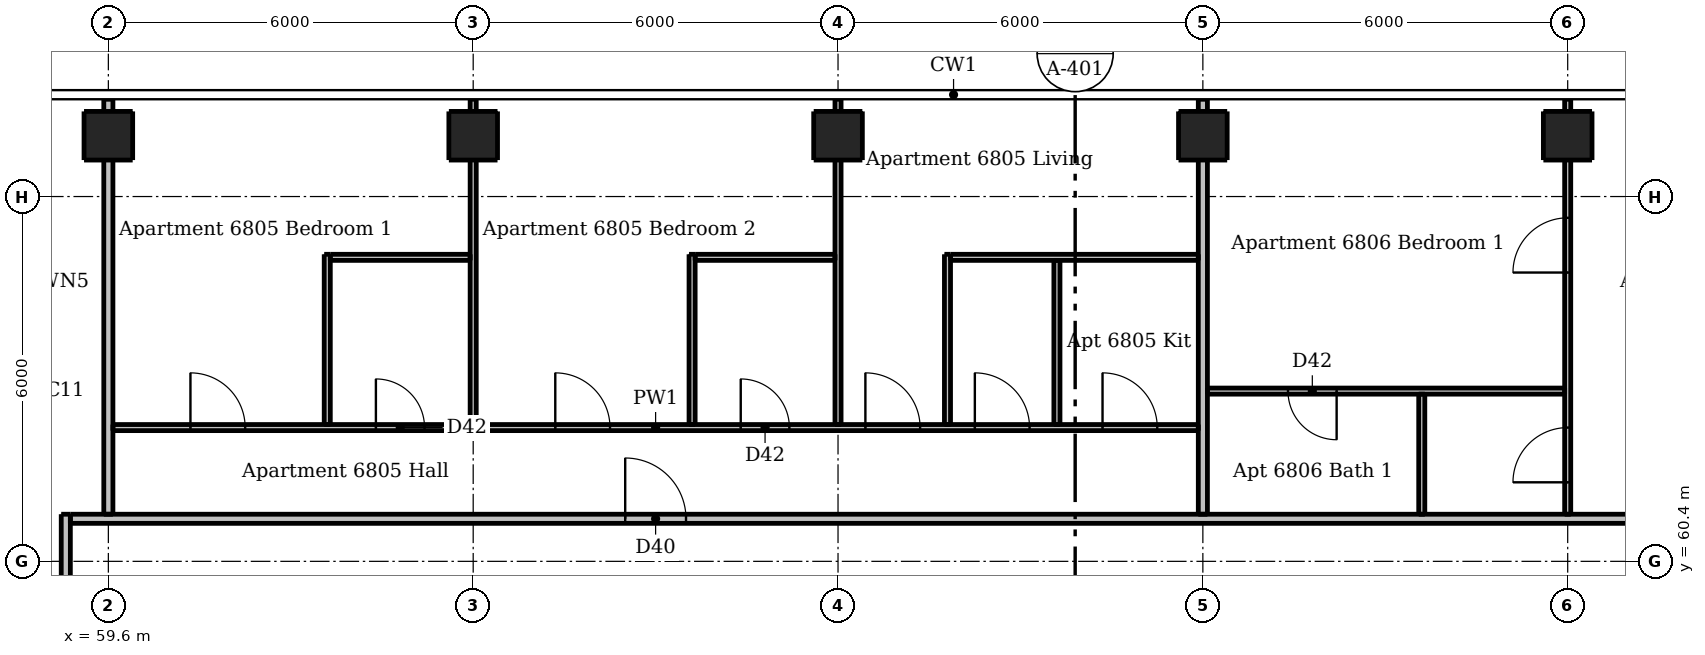
"""IFC4 building model, lengths in metres.
Left out: names, types, materials, properties, quantities, classifications, styles, units other than length and angle.
Written with IfcOpenShell. Run it as: python <this file> out.ifc"""

import sys

from ifc_helpers import new_model, si_unit, direction, frame, frame_2d, origin, origin_2d, place, context, subcontext, project, spatial, rectangle, extrude, element, fill, save


model = new_model("IFC4")
c1 = context("Model", 3, precision=1e-05, world=origin(), true_north=direction((0.0, 1.0)))
c2 = subcontext(c1, "Body", "Model", "MODEL_VIEW")
j1 = project(units=[si_unit("LENGTHUNIT", "METRE"), si_unit("PLANEANGLEUNIT", "RADIAN")], contexts=[c1])
p1 = place(None, origin())
s1 = spatial("IfcSite", under=j1, at=p1, CompositionType="ELEMENT")
p2 = place(p1, origin())
s2 = spatial("IfcBuilding", under=s1, at=p2, CompositionType="ELEMENT")
p3 = place(p2, frame((0.0, 0.0, 255.4)))
s3 = spatial("IfcBuildingStorey", under=s2, at=p3, CompositionType="ELEMENT", Elevation=255.4)
for number, where, z_axis, x_axis in (
    (1, (59.6, 67.4, 0.0), (0.0, 0.0, 1.0), (1.0, 0.0, 0.0)),
    (2, (65.6, 67.4, 0.0), (0.0, 0.0, 1.0), (1.0, 0.0, 0.0)),
    (3, (71.6, 67.4, 0.0), (0.0, 0.0, 1.0), (1.0, 0.0, 0.0)),
    (4, (77.6, 67.4, 0.0), (0.0, 0.0, 1.0), (1.0, 0.0, 0.0)),
    (5, (83.6, 67.4, 0.0), (0.0, 0.0, 1.0), (1.0, 0.0, 0.0)),
):
    element("IfcColumn", number, at=place(p3, frame(where, z_axis=z_axis, x_axis=x_axis)), inside=s3, PredefinedType="COLUMN", context=c2, shape_type="SweptSolid", body=[
        extrude(rectangle(XDim=0.8, YDim=0.8, at=origin_2d()), origin(), (0.0, 0.0, 1.0), 3.05),
    ])
p4 = place(p3, frame((63.2, 62.65, 0.0), z_axis=(0.0, 0.0, 1.0), x_axis=(0.0, 1.0, 0.0)))
e6 = element("IfcWall", 6, at=p4, inside=s3, PredefinedType="PARTITIONING", context=c2, shape_type="SweptSolid", body=[
    extrude(rectangle(XDim=2.8, YDim=0.1, at=frame_2d((1.4, 0.0))), origin(), (0.0, 0.0, 1.0), 3.05),
])
p5 = place(p3, frame((65.6, 62.65, 0.0), z_axis=(0.0, 0.0, 1.0), x_axis=(0.0, 1.0, 0.0)))
e7 = element("IfcWall", 7, at=p5, inside=s3, PredefinedType="PARTITIONING", context=c2, shape_type="SweptSolid", body=[
    extrude(rectangle(XDim=5.35, YDim=0.1, at=frame_2d((2.675, 0.0))), origin(), (0.0, 0.0, 1.0), 2.516),
])
p6 = place(p3, frame((69.2, 62.65, 0.0), z_axis=(0.0, 0.0, 1.0), x_axis=(0.0, 1.0, 0.0)))
e8 = element("IfcWall", 8, at=p6, inside=s3, PredefinedType="PARTITIONING", context=c2, shape_type="SweptSolid", body=[
    extrude(rectangle(XDim=2.8, YDim=0.1, at=frame_2d((1.4, 0.0))), origin(), (0.0, 0.0, 1.0), 3.05),
])
p7 = place(p3, frame((71.6, 62.65, 0.0), z_axis=(0.0, 0.0, 1.0), x_axis=(0.0, 1.0, 0.0)))
e9 = element("IfcWall", 9, at=p7, inside=s3, PredefinedType="PARTITIONING", context=c2, shape_type="SweptSolid", body=[
    extrude(rectangle(XDim=5.35, YDim=0.1, at=frame_2d((2.675, 0.0))), origin(), (0.0, 0.0, 1.0), 2.516),
])
p8 = place(p3, frame((73.4, 62.65, 0.0), z_axis=(0.0, 0.0, 1.0), x_axis=(0.0, 1.0, 0.0)))
e10 = element("IfcWall", 10, at=p8, inside=s3, PredefinedType="PARTITIONING", context=c2, shape_type="SweptSolid", body=[
    extrude(rectangle(XDim=2.8, YDim=0.1, at=frame_2d((1.4, 0.0))), origin(), (0.0, 0.0, 1.0), 3.05),
])
p9 = place(p3, frame((75.2, 62.65, 0.0), z_axis=(0.0, 0.0, 1.0), x_axis=(0.0, 1.0, 0.0)))
e11 = element("IfcWall", 11, at=p9, inside=s3, PredefinedType="PARTITIONING", context=c2, shape_type="SweptSolid", body=[
    extrude(rectangle(XDim=2.7, YDim=0.1, at=frame_2d((1.35, 0.0))), origin(), (0.0, 0.0, 1.0), 3.05),
])
p10 = place(p3, frame((81.2, 61.175, 0.0), z_axis=(0.0, 0.0, 1.0), x_axis=(0.0, 1.0, 0.0)))
e12 = element("IfcWall", 12, at=p10, inside=s3, PredefinedType="PARTITIONING", context=c2, shape_type="SweptSolid", body=[
    extrude(rectangle(XDim=1.975, YDim=0.1, at=frame_2d((0.987, 0.0))), origin(), (0.0, 0.0, 1.0), 3.05),
])
p11 = place(p3, frame((83.6, 61.175, 0.0), z_axis=(0.0, 0.0, 1.0), x_axis=(0.0, 1.0, 0.0)))
e13 = element("IfcWall", 13, at=p11, inside=s3, PredefinedType="PARTITIONING", context=c2, shape_type="SweptSolid", body=[
    extrude(rectangle(XDim=6.825, YDim=0.1, at=frame_2d((3.413, 0.0))), origin(), (0.0, 0.0, 1.0), 2.516),
])
p12 = place(p11, frame((0.525, 0.0, 0.0)))
e14 = element("IfcOpeningElement", 14, at=p12, cuts=e13, PredefinedType="OPENING", context=c2, shape_type="SweptSolid", body=[
    extrude(rectangle(XDim=0.9, YDim=2.1, at=frame_2d((0.45, 1.05))), frame((0.0, 0.06, 0.0), z_axis=(0.0, -1.0, 0.0), x_axis=(1.0, 0.0, 0.0)), (0.0, 0.0, 1.0), 0.12),
])
p13 = place(p11, frame((3.975, 0.0, 0.0)))
e15 = element("IfcOpeningElement", 15, at=p13, cuts=e13, PredefinedType="OPENING", context=c2, shape_type="SweptSolid", body=[
    extrude(rectangle(XDim=0.9, YDim=2.1, at=frame_2d((0.45, 1.05))), frame((0.0, 0.06, 0.0), z_axis=(0.0, -1.0, 0.0), x_axis=(1.0, 0.0, 0.0)), (0.0, 0.0, 1.0), 0.12),
])
for number, where, z_axis, x_axis in (
    (16, (63.25, 65.4, 0.0), (0.0, 0.0, 1.0), (1.0, 0.0, 0.0)),
    (17, (69.25, 65.4, 0.0), (0.0, 0.0, 1.0), (1.0, 0.0, 0.0)),
):
    element("IfcWall", number, at=place(p3, frame(where, z_axis=z_axis, x_axis=x_axis)), inside=s3, PredefinedType="PARTITIONING", context=c2, shape_type="SweptSolid", body=[
        extrude(rectangle(XDim=2.3, YDim=0.1, at=frame_2d((1.15, 0.0))), origin(), (0.0, 0.0, 1.0), 3.05),
    ])
p14 = place(p3, frame((73.45, 65.4, 0.0), z_axis=(0.0, 0.0, 1.0), x_axis=(1.0, 0.0, 0.0)))
e18 = element("IfcWall", 18, at=p14, inside=s3, PredefinedType="PARTITIONING", context=c2, shape_type="SweptSolid", body=[
    extrude(rectangle(XDim=4.075, YDim=0.1, at=frame_2d((2.038, 0.0))), origin(), (0.0, 0.0, 1.0), 3.05),
])
p15 = place(p3, frame((83.55, 63.2, 0.0), z_axis=(0.0, 0.0, 1.0), x_axis=(-1.0, 0.0, 0.0)))
e19 = element("IfcWall", 19, at=p15, inside=s3, PredefinedType="PARTITIONING", context=c2, shape_type="SweptSolid", body=[
    extrude(rectangle(XDim=5.875, YDim=0.1, at=frame_2d((2.938, 0.0))), origin(), (0.0, 0.0, 1.0), 3.05),
])
p16 = place(p15, frame((3.75, 0.0, 0.0)))
e20 = element("IfcOpeningElement", 20, at=p16, cuts=e19, PredefinedType="OPENING", context=c2, shape_type="SweptSolid", body=[
    extrude(rectangle(XDim=0.8, YDim=2.1, at=frame_2d((0.4, 1.05))), frame((0.0, 0.06, 0.0), z_axis=(0.0, -1.0, 0.0), x_axis=(1.0, 0.0, 0.0)), (0.0, 0.0, 1.0), 0.12),
])
p17 = place(p3, frame((59.675, 62.6, 0.0), z_axis=(0.0, 0.0, 1.0), x_axis=(1.0, 0.0, 0.0)))
e21 = element("IfcWall", 21, at=p17, inside=s3, PredefinedType="PARTITIONING", context=c2, shape_type="SweptSolid", body=[
    extrude(rectangle(XDim=17.85, YDim=0.1, at=frame_2d((8.925, 0.0))), origin(), (0.0, 0.0, 1.0), 3.05),
])
p18 = place(p17, frame((12.375, 0.0, 0.0)))
e22 = element("IfcOpeningElement", 22, at=p18, cuts=e21, PredefinedType="OPENING", context=c2, shape_type="SweptSolid", body=[
    extrude(rectangle(XDim=0.9, YDim=2.1, at=frame_2d((0.45, 1.05))), frame((0.0, 0.06, 0.0), z_axis=(0.0, -1.0, 0.0), x_axis=(1.0, 0.0, 0.0)), (0.0, 0.0, 1.0), 0.12),
])
p19 = place(p17, frame((16.275, 0.0, 0.0)))
e23 = element("IfcOpeningElement", 23, at=p19, cuts=e21, PredefinedType="OPENING", context=c2, shape_type="SweptSolid", body=[
    extrude(rectangle(XDim=0.9, YDim=2.1, at=frame_2d((0.45, 1.05))), frame((0.0, 0.06, 0.0), z_axis=(0.0, -1.0, 0.0), x_axis=(1.0, 0.0, 0.0)), (0.0, 0.0, 1.0), 0.12),
])
p20 = place(p17, frame((14.175, 0.0, 0.0)))
e24 = element("IfcOpeningElement", 24, at=p20, cuts=e21, PredefinedType="OPENING", context=c2, shape_type="SweptSolid", body=[
    extrude(rectangle(XDim=0.9, YDim=2.1, at=frame_2d((0.45, 1.05))), frame((0.0, 0.06, 0.0), z_axis=(0.0, -1.0, 0.0), x_axis=(1.0, 0.0, 0.0)), (0.0, 0.0, 1.0), 0.12),
])
p21 = place(p17, frame((1.275, 0.0, 0.0)))
e25 = element("IfcOpeningElement", 25, at=p21, cuts=e21, PredefinedType="OPENING", context=c2, shape_type="SweptSolid", body=[
    extrude(rectangle(XDim=0.9, YDim=2.1, at=frame_2d((0.45, 1.05))), frame((0.0, 0.06, 0.0), z_axis=(0.0, -1.0, 0.0), x_axis=(1.0, 0.0, 0.0)), (0.0, 0.0, 1.0), 0.12),
])
p22 = place(p17, frame((7.275, 0.0, 0.0)))
e26 = element("IfcOpeningElement", 26, at=p22, cuts=e21, PredefinedType="OPENING", context=c2, shape_type="SweptSolid", body=[
    extrude(rectangle(XDim=0.9, YDim=2.1, at=frame_2d((0.45, 1.05))), frame((0.0, 0.06, 0.0), z_axis=(0.0, -1.0, 0.0), x_axis=(1.0, 0.0, 0.0)), (0.0, 0.0, 1.0), 0.12),
])
p23 = place(p17, frame((4.325, 0.0, 0.0)))
e27 = element("IfcOpeningElement", 27, at=p23, cuts=e21, PredefinedType="OPENING", context=c2, shape_type="SweptSolid", body=[
    extrude(rectangle(XDim=0.8, YDim=2.1, at=frame_2d((0.4, 1.05))), frame((0.0, 0.06, 0.0), z_axis=(0.0, -1.0, 0.0), x_axis=(1.0, 0.0, 0.0)), (0.0, 0.0, 1.0), 0.12),
])
p24 = place(p17, frame((10.325, 0.0, 0.0)))
e28 = element("IfcOpeningElement", 28, at=p24, cuts=e21, PredefinedType="OPENING", context=c2, shape_type="SweptSolid", body=[
    extrude(rectangle(XDim=0.8, YDim=2.1, at=frame_2d((0.4, 1.05))), frame((0.0, 0.06, 0.0), z_axis=(0.0, -1.0, 0.0), x_axis=(1.0, 0.0, 0.0)), (0.0, 0.0, 1.0), 0.12),
])
p25 = place(p3, frame((58.9, 30.325, 0.0), z_axis=(0.0, 0.0, 1.0), x_axis=(0.0, 1.0, 0.0)))
e29 = element("IfcWall", 29, at=p25, inside=s3, PredefinedType="PARTITIONING", context=c2, shape_type="SweptSolid", body=[
    extrude(rectangle(XDim=30.85, YDim=0.15, at=frame_2d((15.425, 0.0))), origin(), (0.0, 0.0, 1.0), 3.05),
])
p26 = place(p25, frame((7.375, 0.0, 0.0)))
e30 = element("IfcOpeningElement", 30, at=p26, cuts=e29, PredefinedType="OPENING", context=c2, shape_type="SweptSolid", body=[
    extrude(rectangle(XDim=1.0, YDim=2.1, at=frame_2d((0.5, 1.05))), frame((0.0, 0.085, 0.0), z_axis=(0.0, -1.0, 0.0), x_axis=(1.0, 0.0, 0.0)), (0.0, 0.0, 1.0), 0.17),
])
p27 = place(p25, frame((26.925, 0.0, 0.0)))
e31 = element("IfcOpeningElement", 31, at=p27, cuts=e29, PredefinedType="OPENING", context=c2, shape_type="SweptSolid", body=[
    extrude(rectangle(XDim=1.0, YDim=2.1, at=frame_2d((0.5, 1.05))), frame((0.0, 0.085, 0.0), z_axis=(0.0, -1.0, 0.0), x_axis=(1.0, 0.0, 0.0)), (0.0, 0.0, 1.0), 0.17),
])
p28 = place(p3, frame((59.6, 61.175, 0.0), z_axis=(0.0, 0.0, 1.0), x_axis=(0.0, 1.0, 0.0)))
e32 = element("IfcWall", 32, at=p28, inside=s3, PredefinedType="PARTITIONING", context=c2, shape_type="SweptSolid", body=[
    extrude(rectangle(XDim=6.825, YDim=0.15, at=frame_2d((3.413, 0.0))), origin(), (0.0, 0.0, 1.0), 2.51),
])
p29 = place(p3, frame((77.6, 61.175, 0.0), z_axis=(0.0, 0.0, 1.0), x_axis=(0.0, 1.0, 0.0)))
e33 = element("IfcWall", 33, at=p29, inside=s3, PredefinedType="PARTITIONING", context=c2, shape_type="SweptSolid", body=[
    extrude(rectangle(XDim=6.825, YDim=0.15, at=frame_2d((3.413, 0.0))), origin(), (0.0, 0.0, 1.0), 2.516),
])
p30 = place(p3, frame((58.975, 61.1, 0.0), z_axis=(0.0, 0.0, 1.0), x_axis=(1.0, 0.0, 0.0)))
e34 = element("IfcWall", 34, at=p30, inside=s3, PredefinedType="PARTITIONING", context=c2, shape_type="SweptSolid", body=[
    extrude(rectangle(XDim=29.25, YDim=0.15, at=frame_2d((14.625, 0.0))), origin(), (0.0, 0.0, 1.0), 3.05),
])
p31 = place(p30, frame((9.125, 0.0, 0.0)))
e35 = element("IfcOpeningElement", 35, at=p31, cuts=e34, PredefinedType="OPENING", context=c2, shape_type="SweptSolid", body=[
    extrude(rectangle(XDim=1.0, YDim=2.1, at=frame_2d((0.5, 1.05))), frame((0.0, 0.085, 0.0), z_axis=(0.0, -1.0, 0.0), x_axis=(1.0, 0.0, 0.0)), (0.0, 0.0, 1.0), 0.17),
])
p32 = place(p30, frame((26.475, 0.0, 0.0)))
e36 = element("IfcOpeningElement", 36, at=p32, cuts=e34, PredefinedType="OPENING", context=c2, shape_type="SweptSolid", body=[
    extrude(rectangle(XDim=1.0, YDim=2.1, at=frame_2d((0.5, 1.05))), frame((0.0, 0.085, 0.0), z_axis=(0.0, -1.0, 0.0), x_axis=(1.0, 0.0, 0.0)), (0.0, 0.0, 1.0), 0.17),
])
p33 = place(p31, origin())
e37 = element("IfcDoor", 37, at=p33, inside=s3, OperationType="SINGLE_SWING_LEFT", PredefinedType="DOOR", context=c2, shape_type="SweptSolid", body=[
    extrude(rectangle(XDim=1.0, YDim=2.1, at=frame_2d((0.5, 1.05))), frame((0.0, 0.025, 0.0), z_axis=(0.0, -1.0, 0.0), x_axis=(1.0, 0.0, 0.0)), (0.0, 0.0, 1.0), 0.05),
])
fill(e35, e37)
p34 = place(p18, origin())
e38 = element("IfcDoor", 38, at=p34, inside=s3, OperationType="SINGLE_SWING_LEFT", PredefinedType="DOOR", context=c2, shape_type="SweptSolid", body=[
    extrude(rectangle(XDim=0.9, YDim=2.1, at=frame_2d((0.45, 1.05))), frame((0.0, 0.025, 0.0), z_axis=(0.0, -1.0, 0.0), x_axis=(1.0, 0.0, 0.0)), (0.0, 0.0, 1.0), 0.05),
])
fill(e22, e38)
p35 = place(p19, origin())
e39 = element("IfcDoor", 39, at=p35, inside=s3, OperationType="SINGLE_SWING_LEFT", PredefinedType="DOOR", context=c2, shape_type="SweptSolid", body=[
    extrude(rectangle(XDim=0.9, YDim=2.1, at=frame_2d((0.45, 1.05))), frame((0.0, 0.025, 0.0), z_axis=(0.0, -1.0, 0.0), x_axis=(1.0, 0.0, 0.0)), (0.0, 0.0, 1.0), 0.05),
])
fill(e23, e39)
p36 = place(p20, origin())
e40 = element("IfcDoor", 40, at=p36, inside=s3, OperationType="SINGLE_SWING_LEFT", PredefinedType="DOOR", context=c2, shape_type="SweptSolid", body=[
    extrude(rectangle(XDim=0.9, YDim=2.1, at=frame_2d((0.45, 1.05))), frame((0.0, 0.025, 0.0), z_axis=(0.0, -1.0, 0.0), x_axis=(1.0, 0.0, 0.0)), (0.0, 0.0, 1.0), 0.05),
])
fill(e24, e40)
p37 = place(p21, origin())
e41 = element("IfcDoor", 41, at=p37, inside=s3, OperationType="SINGLE_SWING_LEFT", PredefinedType="DOOR", context=c2, shape_type="SweptSolid", body=[
    extrude(rectangle(XDim=0.9, YDim=2.1, at=frame_2d((0.45, 1.05))), frame((0.0, 0.025, 0.0), z_axis=(0.0, -1.0, 0.0), x_axis=(1.0, 0.0, 0.0)), (0.0, 0.0, 1.0), 0.05),
])
fill(e25, e41)
p38 = place(p22, origin())
e42 = element("IfcDoor", 42, at=p38, inside=s3, OperationType="SINGLE_SWING_LEFT", PredefinedType="DOOR", context=c2, shape_type="SweptSolid", body=[
    extrude(rectangle(XDim=0.9, YDim=2.1, at=frame_2d((0.45, 1.05))), frame((0.0, 0.025, 0.0), z_axis=(0.0, -1.0, 0.0), x_axis=(1.0, 0.0, 0.0)), (0.0, 0.0, 1.0), 0.05),
])
fill(e26, e42)
p39 = place(p23, origin())
e43 = element("IfcDoor", 43, at=p39, inside=s3, OperationType="SINGLE_SWING_LEFT", PredefinedType="DOOR", context=c2, shape_type="SweptSolid", body=[
    extrude(rectangle(XDim=0.8, YDim=2.1, at=frame_2d((0.4, 1.05))), frame((0.0, 0.025, 0.0), z_axis=(0.0, -1.0, 0.0), x_axis=(1.0, 0.0, 0.0)), (0.0, 0.0, 1.0), 0.05),
])
fill(e27, e43)
p40 = place(p24, origin())
e44 = element("IfcDoor", 44, at=p40, inside=s3, OperationType="SINGLE_SWING_LEFT", PredefinedType="DOOR", context=c2, shape_type="SweptSolid", body=[
    extrude(rectangle(XDim=0.8, YDim=2.1, at=frame_2d((0.4, 1.05))), frame((0.0, 0.025, 0.0), z_axis=(0.0, -1.0, 0.0), x_axis=(1.0, 0.0, 0.0)), (0.0, 0.0, 1.0), 0.05),
])
fill(e28, e44)
p41 = place(p12, origin())
e45 = element("IfcDoor", 45, at=p41, inside=s3, OperationType="SINGLE_SWING_LEFT", PredefinedType="DOOR", context=c2, shape_type="SweptSolid", body=[
    extrude(rectangle(XDim=0.9, YDim=2.1, at=frame_2d((0.45, 1.05))), frame((0.0, 0.025, 0.0), z_axis=(0.0, -1.0, 0.0), x_axis=(1.0, 0.0, 0.0)), (0.0, 0.0, 1.0), 0.05),
])
fill(e14, e45)
p42 = place(p13, origin())
e46 = element("IfcDoor", 46, at=p42, inside=s3, OperationType="SINGLE_SWING_LEFT", PredefinedType="DOOR", context=c2, shape_type="SweptSolid", body=[
    extrude(rectangle(XDim=0.9, YDim=2.1, at=frame_2d((0.45, 1.05))), frame((0.0, 0.025, 0.0), z_axis=(0.0, -1.0, 0.0), x_axis=(1.0, 0.0, 0.0)), (0.0, 0.0, 1.0), 0.05),
])
fill(e15, e46)
p43 = place(p16, origin())
e47 = element("IfcDoor", 47, at=p43, inside=s3, OperationType="SINGLE_SWING_LEFT", PredefinedType="DOOR", context=c2, shape_type="SweptSolid", body=[
    extrude(rectangle(XDim=0.8, YDim=2.1, at=frame_2d((0.4, 1.05))), frame((0.0, 0.025, 0.0), z_axis=(0.0, -1.0, 0.0), x_axis=(1.0, 0.0, 0.0)), (0.0, 0.0, 1.0), 0.05),
])
fill(e20, e47)
save(model, sys.argv[1])
